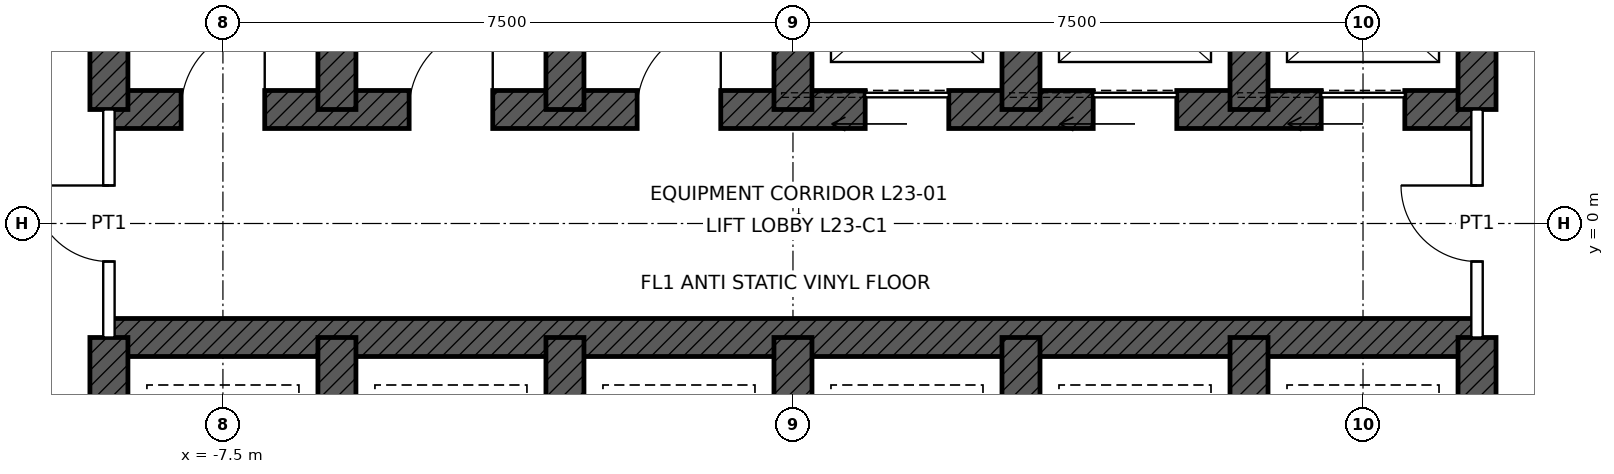
"""IFC4 building model, lengths in metres.
Left out: names, types, materials, properties, quantities, classifications, styles, units other than length and angle.
Written with IfcOpenShell. Run it as: python <this file> out.ifc"""

import sys

from ifc_helpers import new_model, si_unit, direction, frame, frame_2d, origin, place, context, subcontext, project, spatial, rectangle, extrude, element, fill, save


model = new_model("IFC4")
c1 = context("Model", 3, precision=1e-05, world=origin(), true_north=direction((0.0, 1.0)))
c2 = subcontext(c1, "Body", "Model", "MODEL_VIEW")
j1 = project(units=[si_unit("LENGTHUNIT", "METRE"), si_unit("PLANEANGLEUNIT", "RADIAN")], contexts=[c1])
p1 = place(None, origin())
s1 = spatial("IfcSite", under=j1, at=p1, CompositionType="ELEMENT")
p2 = place(p1, origin())
s2 = spatial("IfcBuilding", under=s1, at=p2, CompositionType="ELEMENT")
p3 = place(p2, frame((0.0, 0.0, 117.9)))
s3 = spatial("IfcBuildingStorey", under=s2, at=p3, CompositionType="ELEMENT", Elevation=117.9)
p4 = place(p3, frame((-9.0, 1.5, 0.0), z_axis=(0.0, 0.0, 1.0), x_axis=(1.0, 0.0, 0.0)))
e1 = element("IfcWall", 1, at=p4, inside=s3, PredefinedType="SHEAR", context=c2, shape_type="SweptSolid", body=[
    extrude(rectangle(XDim=18.0, YDim=0.5, at=frame_2d((9.0, 0.0))), origin(), (0.0, 0.0, 1.0), 4.5),
])
p5 = place(p4, frame((9.95, 0.0, 0.0)))
e2 = element("IfcOpeningElement", 2, at=p5, cuts=e1, PredefinedType="OPENING", context=c2, shape_type="SweptSolid", body=[
    extrude(rectangle(XDim=1.1, YDim=2.1, at=frame_2d((0.55, 1.05))), frame((0.0, 0.26, 0.0), z_axis=(0.0, -1.0, 0.0), x_axis=(1.0, 0.0, 0.0)), (0.0, 0.0, 1.0), 0.52),
])
p6 = place(p4, frame((12.95, 0.0, 0.0)))
e3 = element("IfcOpeningElement", 3, at=p6, cuts=e1, PredefinedType="OPENING", context=c2, shape_type="SweptSolid", body=[
    extrude(rectangle(XDim=1.1, YDim=2.1, at=frame_2d((0.55, 1.05))), frame((0.0, 0.26, 0.0), z_axis=(0.0, -1.0, 0.0), x_axis=(1.0, 0.0, 0.0)), (0.0, 0.0, 1.0), 0.52),
])
p7 = place(p4, frame((15.95, 0.0, 0.0)))
e4 = element("IfcOpeningElement", 4, at=p7, cuts=e1, PredefinedType="OPENING", context=c2, shape_type="SweptSolid", body=[
    extrude(rectangle(XDim=1.1, YDim=2.1, at=frame_2d((0.55, 1.05))), frame((0.0, 0.26, 0.0), z_axis=(0.0, -1.0, 0.0), x_axis=(1.0, 0.0, 0.0)), (0.0, 0.0, 1.0), 0.52),
])
p8 = place(p4, frame((0.95, 0.0, 0.0)))
e5 = element("IfcOpeningElement", 5, at=p8, cuts=e1, PredefinedType="OPENING", context=c2, shape_type="SweptSolid", body=[
    extrude(rectangle(XDim=1.1, YDim=2.1, at=frame_2d((0.55, 1.05))), frame((0.0, 0.26, 0.0), z_axis=(0.0, -1.0, 0.0), x_axis=(1.0, 0.0, 0.0)), (0.0, 0.0, 1.0), 0.52),
])
p9 = place(p4, frame((3.95, 0.0, 0.0)))
e6 = element("IfcOpeningElement", 6, at=p9, cuts=e1, PredefinedType="OPENING", context=c2, shape_type="SweptSolid", body=[
    extrude(rectangle(XDim=1.1, YDim=2.1, at=frame_2d((0.55, 1.05))), frame((0.0, 0.26, 0.0), z_axis=(0.0, -1.0, 0.0), x_axis=(1.0, 0.0, 0.0)), (0.0, 0.0, 1.0), 0.52),
])
p10 = place(p4, frame((6.95, 0.0, 0.0)))
e7 = element("IfcOpeningElement", 7, at=p10, cuts=e1, PredefinedType="OPENING", context=c2, shape_type="SweptSolid", body=[
    extrude(rectangle(XDim=1.1, YDim=2.1, at=frame_2d((0.55, 1.05))), frame((0.0, 0.26, 0.0), z_axis=(0.0, -1.0, 0.0), x_axis=(1.0, 0.0, 0.0)), (0.0, 0.0, 1.0), 0.52),
])
p11 = place(p3, frame((-9.0, -1.5, 0.0), z_axis=(0.0, 0.0, 1.0), x_axis=(1.0, 0.0, 0.0)))
e8 = element("IfcWall", 8, at=p11, inside=s3, PredefinedType="SHEAR", context=c2, shape_type="SweptSolid", body=[
    extrude(rectangle(XDim=18.0, YDim=0.5, at=frame_2d((9.0, 0.0))), origin(), (0.0, 0.0, 1.0), 4.5),
])
for number, where, z_axis, x_axis in (
    (9, (-9.0, 1.5, 0.0), (0.0, 0.0, 1.0), (0.0, 1.0, 0.0)),
    (10, (9.0, 1.5, 0.0), (0.0, 0.0, 1.0), (0.0, 1.0, 0.0)),
    (11, (-9.0, -4.5, 0.0), (0.0, 0.0, 1.0), (0.0, 1.0, 0.0)),
    (12, (9.0, -4.5, 0.0), (0.0, 0.0, 1.0), (0.0, 1.0, 0.0)),
    (13, (-6.0, 1.5, 0.0), (0.0, 0.0, 1.0), (0.0, 1.0, 0.0)),
    (14, (-3.0, 1.5, 0.0), (0.0, 0.0, 1.0), (0.0, 1.0, 0.0)),
    (15, (0.0, 1.5, 0.0), (0.0, 0.0, 1.0), (0.0, 1.0, 0.0)),
    (16, (3.0, 1.5, 0.0), (0.0, 0.0, 1.0), (0.0, 1.0, 0.0)),
    (17, (6.0, 1.5, 0.0), (0.0, 0.0, 1.0), (0.0, 1.0, 0.0)),
    (18, (-6.0, -4.5, 0.0), (0.0, 0.0, 1.0), (0.0, 1.0, 0.0)),
    (19, (-3.0, -4.5, 0.0), (0.0, 0.0, 1.0), (0.0, 1.0, 0.0)),
    (20, (0.0, -4.5, 0.0), (0.0, 0.0, 1.0), (0.0, 1.0, 0.0)),
    (21, (3.0, -4.5, 0.0), (0.0, 0.0, 1.0), (0.0, 1.0, 0.0)),
    (22, (6.0, -4.5, 0.0), (0.0, 0.0, 1.0), (0.0, 1.0, 0.0)),
):
    element("IfcWall", number, at=place(p3, frame(where, z_axis=z_axis, x_axis=x_axis)), inside=s3, PredefinedType="SHEAR", context=c2, shape_type="SweptSolid", body=[
        extrude(rectangle(XDim=3.0, YDim=0.5, at=frame_2d((1.5, 0.0))), origin(), (0.0, 0.0, 1.0), 4.5),
    ])
p12 = place(p3, frame((-9.0, -1.5, 0.0), z_axis=(0.0, 0.0, 1.0), x_axis=(0.0, 1.0, 0.0)))
e23 = element("IfcWall", 23, at=p12, inside=s3, PredefinedType="PARTITIONING", context=c2, shape_type="SweptSolid", body=[
    extrude(rectangle(XDim=3.0, YDim=0.15, at=frame_2d((1.5, 0.0))), origin(), (0.0, 0.0, 1.0), 4.25),
])
p13 = place(p12, frame((1.0, 0.0, 0.0)))
e24 = element("IfcOpeningElement", 24, at=p13, cuts=e23, PredefinedType="OPENING", context=c2, shape_type="SweptSolid", body=[
    extrude(rectangle(XDim=1.0, YDim=2.4, at=frame_2d((0.5, 1.2))), frame((0.0, 0.085, 0.0), z_axis=(0.0, -1.0, 0.0), x_axis=(1.0, 0.0, 0.0)), (0.0, 0.0, 1.0), 0.17),
])
p14 = place(p3, frame((9.0, -1.5, 0.0), z_axis=(0.0, 0.0, 1.0), x_axis=(0.0, 1.0, 0.0)))
e25 = element("IfcWall", 25, at=p14, inside=s3, PredefinedType="PARTITIONING", context=c2, shape_type="SweptSolid", body=[
    extrude(rectangle(XDim=3.0, YDim=0.15, at=frame_2d((1.5, 0.0))), origin(), (0.0, 0.0, 1.0), 4.25),
])
p15 = place(p14, frame((1.0, 0.0, 0.0)))
e26 = element("IfcOpeningElement", 26, at=p15, cuts=e25, PredefinedType="OPENING", context=c2, shape_type="SweptSolid", body=[
    extrude(rectangle(XDim=1.0, YDim=2.4, at=frame_2d((0.5, 1.2))), frame((0.0, 0.085, 0.0), z_axis=(0.0, -1.0, 0.0), x_axis=(1.0, 0.0, 0.0)), (0.0, 0.0, 1.0), 0.17),
])
p16 = place(p5, origin())
e27 = element("IfcDoor", 27, at=p16, inside=s3, OperationType="SLIDING_TO_LEFT", PredefinedType="DOOR", context=c2, shape_type="SweptSolid", body=[
    extrude(rectangle(XDim=1.1, YDim=2.1, at=frame_2d((0.55, 1.05))), frame((0.0, 0.025, 0.0), z_axis=(0.0, -1.0, 0.0), x_axis=(1.0, 0.0, 0.0)), (0.0, 0.0, 1.0), 0.05),
])
fill(e2, e27)
p17 = place(p6, origin())
e28 = element("IfcDoor", 28, at=p17, inside=s3, OperationType="SLIDING_TO_LEFT", PredefinedType="DOOR", context=c2, shape_type="SweptSolid", body=[
    extrude(rectangle(XDim=1.1, YDim=2.1, at=frame_2d((0.55, 1.05))), frame((0.0, 0.025, 0.0), z_axis=(0.0, -1.0, 0.0), x_axis=(1.0, 0.0, 0.0)), (0.0, 0.0, 1.0), 0.05),
])
fill(e3, e28)
p18 = place(p7, origin())
e29 = element("IfcDoor", 29, at=p18, inside=s3, OperationType="SLIDING_TO_LEFT", PredefinedType="DOOR", context=c2, shape_type="SweptSolid", body=[
    extrude(rectangle(XDim=1.1, YDim=2.1, at=frame_2d((0.55, 1.05))), frame((0.0, 0.025, 0.0), z_axis=(0.0, -1.0, 0.0), x_axis=(1.0, 0.0, 0.0)), (0.0, 0.0, 1.0), 0.05),
])
fill(e4, e29)
p19 = place(p13, origin())
e30 = element("IfcDoor", 30, at=p19, inside=s3, OperationType="SINGLE_SWING_RIGHT", PredefinedType="DOOR", context=c2, shape_type="SweptSolid", body=[
    extrude(rectangle(XDim=1.0, YDim=2.4, at=frame_2d((0.5, 1.2))), frame((0.0, 0.025, 0.0), z_axis=(0.0, -1.0, 0.0), x_axis=(1.0, 0.0, 0.0)), (0.0, 0.0, 1.0), 0.05),
])
fill(e24, e30)
p20 = place(p15, origin())
e31 = element("IfcDoor", 31, at=p20, inside=s3, OperationType="SINGLE_SWING_RIGHT", PredefinedType="DOOR", context=c2, shape_type="SweptSolid", body=[
    extrude(rectangle(XDim=1.0, YDim=2.4, at=frame_2d((0.5, 1.2))), frame((0.0, 0.025, 0.0), z_axis=(0.0, -1.0, 0.0), x_axis=(1.0, 0.0, 0.0)), (0.0, 0.0, 1.0), 0.05),
])
fill(e26, e31)
p21 = place(p8, origin())
e32 = element("IfcDoor", 32, at=p21, inside=s3, OperationType="SINGLE_SWING_RIGHT", PredefinedType="DOOR", context=c2, shape_type="SweptSolid", body=[
    extrude(rectangle(XDim=1.1, YDim=2.1, at=frame_2d((0.55, 1.05))), frame((0.0, 0.025, 0.0), z_axis=(0.0, -1.0, 0.0), x_axis=(1.0, 0.0, 0.0)), (0.0, 0.0, 1.0), 0.05),
])
fill(e5, e32)
p22 = place(p9, origin())
e33 = element("IfcDoor", 33, at=p22, inside=s3, OperationType="SINGLE_SWING_RIGHT", PredefinedType="DOOR", context=c2, shape_type="SweptSolid", body=[
    extrude(rectangle(XDim=1.1, YDim=2.1, at=frame_2d((0.55, 1.05))), frame((0.0, 0.025, 0.0), z_axis=(0.0, -1.0, 0.0), x_axis=(1.0, 0.0, 0.0)), (0.0, 0.0, 1.0), 0.05),
])
fill(e6, e33)
p23 = place(p10, origin())
e34 = element("IfcDoor", 34, at=p23, inside=s3, OperationType="SINGLE_SWING_RIGHT", PredefinedType="DOOR", context=c2, shape_type="SweptSolid", body=[
    extrude(rectangle(XDim=1.1, YDim=2.1, at=frame_2d((0.55, 1.05))), frame((0.0, 0.025, 0.0), z_axis=(0.0, -1.0, 0.0), x_axis=(1.0, 0.0, 0.0)), (0.0, 0.0, 1.0), 0.05),
])
fill(e7, e34)
save(model, sys.argv[1])
